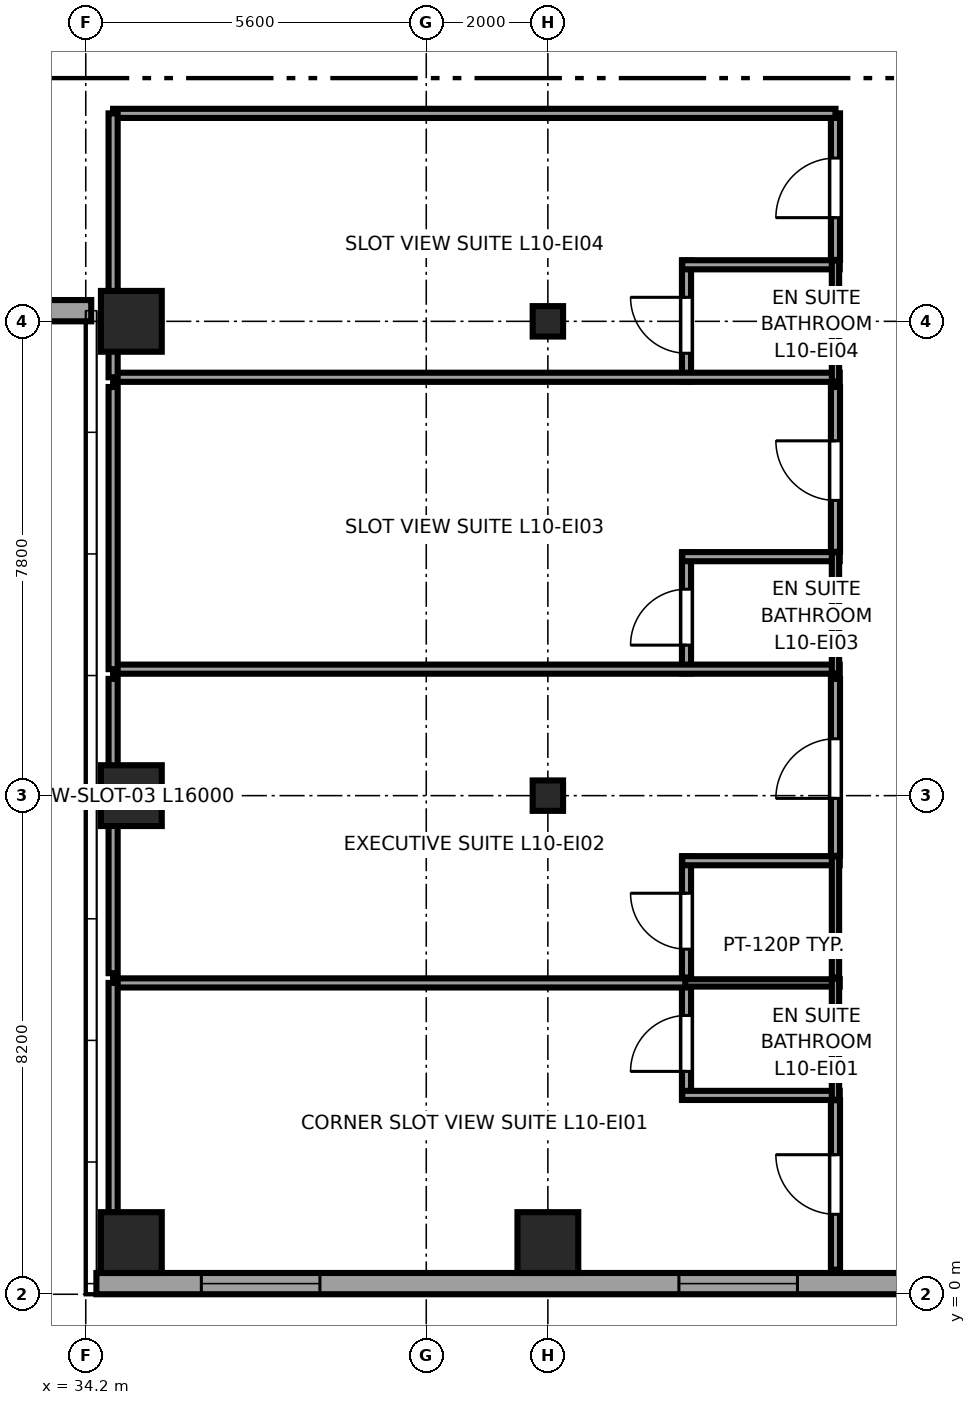
"""IFC4 building model, lengths in metres.
Left out: names, types, materials, properties, quantities, classifications, styles, units other than length and angle.
Written with IfcOpenShell. Run it as: python <this file> out.ifc"""

import sys

from ifc_helpers import new_model, si_unit, direction, frame, frame_2d, origin, origin_2d, place, context, subcontext, project, spatial, rectangle, i_section, extrude, source, transform, mapped, element, fill, save


model = new_model("IFC4")
c1 = context("Model", 3, precision=1e-05, world=origin(), true_north=direction((0.0, 1.0)))
c2 = subcontext(c1, "Body", "Model", "MODEL_VIEW")
j1 = project(units=[si_unit("LENGTHUNIT", "METRE"), si_unit("PLANEANGLEUNIT", "RADIAN")], contexts=[c1])
p1 = place(None, origin())
s1 = spatial("IfcSite", under=j1, at=p1, CompositionType="ELEMENT")
p2 = place(p1, origin())
s2 = spatial("IfcBuilding", under=s1, at=p2, CompositionType="ELEMENT")
p3 = place(p2, frame((0.0, 0.0, 46.2)))
s3 = spatial("IfcBuildingStorey", under=s2, at=p3, CompositionType="ELEMENT", Elevation=46.2)
m1 = source(origin(), c2, "Body", "SweptSolid", [
    extrude(rectangle(XDim=1.0, YDim=1.0, at=origin_2d()), origin(), (0.0, 0.0, 1.0), 3.55),
])
for number, where, z_axis, x_axis in (
    (1, (34.95, 0.85, 0.0), (0.0, 0.0, 1.0), (1.0, 0.0, 0.0)),
    (2, (34.95, 8.2, 0.0), (0.0, 0.0, 1.0), (1.0, 0.0, 0.0)),
    (3, (34.95, 16.0, 0.0), (0.0, 0.0, 1.0), (1.0, 0.0, 0.0)),
    (4, (41.8, 0.85, 0.0), (0.0, 0.0, 1.0), (1.0, 0.0, 0.0)),
):
    element("IfcColumn", number, at=place(p3, frame(where, z_axis=z_axis, x_axis=x_axis)), inside=s3, PredefinedType="COLUMN", context=c2, shape_type="MappedRepresentation", body=[
        mapped(m1, transform((0.0, 0.0, 0.0), x_axis=(1.0, 0.0, 0.0), y_axis=(0.0, 1.0, 0.0), z_axis=(0.0, 0.0, 1.0), scale=1.0)),
    ])
m2 = source(origin(), c2, "Body", "SweptSolid", [
    extrude(i_section(OverallWidth=0.5, OverallDepth=0.5, WebThickness=0.028, FlangeThickness=0.045, at=origin_2d()), origin(), (0.0, 0.0, 1.0), 3.55),
])
for number, where, z_axis, x_axis in (
    (5, (41.8, 8.2, 0.0), (0.0, 0.0, 1.0), (1.0, 0.0, 0.0)),
    (6, (41.8, 16.0, 0.0), (0.0, 0.0, 1.0), (1.0, 0.0, 0.0)),
):
    element("IfcColumn", number, at=place(p3, frame(where, z_axis=z_axis, x_axis=x_axis)), inside=s3, PredefinedType="COLUMN", context=c2, shape_type="MappedRepresentation", body=[
        mapped(m2, transform((0.0, 0.0, 0.0), x_axis=(1.0, 0.0, 0.0), y_axis=(0.0, 1.0, 0.0), z_axis=(0.0, 0.0, 1.0), scale=1.0)),
    ])
p4 = place(p3, frame((22.71, 16.175, 0.0), z_axis=(0.0, 0.0, 1.0), x_axis=(1.0, 0.0, 0.0)))
e7 = element("IfcWall", 7, at=p4, inside=s3, PredefinedType="SOLIDWALL", context=c2, shape_type="SweptSolid", body=[
    extrude(rectangle(XDim=11.58, YDim=0.35, at=frame_2d((5.79, 0.0))), origin(), (0.0, 0.0, 1.0), 2.748),
])
p5 = place(p4, frame((2.22, 0.0, 0.68)))
e8 = element("IfcOpeningElement", 8, at=p5, cuts=e7, PredefinedType="OPENING", context=c2, shape_type="SweptSolid", body=[
    extrude(rectangle(XDim=1.95, YDim=1.82, at=frame_2d((0.975, 0.91))), frame((0.0, 0.185, 0.0), z_axis=(0.0, -1.0, 0.0), x_axis=(1.0, 0.0, 0.0)), (0.0, 0.0, 1.0), 0.37),
])
p6 = place(p4, frame((7.41, 0.0, 0.68)))
e9 = element("IfcOpeningElement", 9, at=p6, cuts=e7, PredefinedType="OPENING", context=c2, shape_type="SweptSolid", body=[
    extrude(rectangle(XDim=1.95, YDim=1.82, at=frame_2d((0.975, 0.91))), frame((0.0, 0.185, 0.0), z_axis=(0.0, -1.0, 0.0), x_axis=(1.0, 0.0, 0.0)), (0.0, 0.0, 1.0), 0.37),
])
p7 = place(p3, frame((34.375, 0.175, 0.0), z_axis=(0.0, 0.0, 1.0), x_axis=(1.0, 0.0, 0.0)))
e10 = element("IfcWall", 10, at=p7, inside=s3, PredefinedType="SOLIDWALL", context=c2, shape_type="SweptSolid", body=[
    extrude(rectangle(XDim=18.008, YDim=0.35, at=frame_2d((9.004, 0.0))), origin(), (0.0, 0.0, 1.0), 3.37),
])
p8 = place(p7, frame((1.726, 0.0, 0.68)))
e11 = element("IfcOpeningElement", 11, at=p8, cuts=e10, PredefinedType="OPENING", context=c2, shape_type="SweptSolid", body=[
    extrude(rectangle(XDim=1.95, YDim=1.82, at=frame_2d((0.975, 0.91))), frame((0.0, 0.185, 0.0), z_axis=(0.0, -1.0, 0.0), x_axis=(1.0, 0.0, 0.0)), (0.0, 0.0, 1.0), 0.37),
])
p9 = place(p7, frame((9.58, 0.0, 0.68)))
e12 = element("IfcOpeningElement", 12, at=p9, cuts=e10, PredefinedType="OPENING", context=c2, shape_type="SweptSolid", body=[
    extrude(rectangle(XDim=1.95, YDim=1.82, at=frame_2d((0.975, 0.91))), frame((0.0, 0.185, 0.0), z_axis=(0.0, -1.0, 0.0), x_axis=(1.0, 0.0, 0.0)), (0.0, 0.0, 1.0), 0.37),
])
p10 = place(p7, frame((15.725, 0.0, 0.62)))
e13 = element("IfcOpeningElement", 13, at=p10, cuts=e10, PredefinedType="OPENING", context=c2, shape_type="SweptSolid", body=[
    extrude(rectangle(XDim=1.5, YDim=1.55, at=frame_2d((0.75, 0.775))), frame((0.0, 0.185, 0.0), z_axis=(0.0, -1.0, 0.0), x_axis=(1.0, 0.0, 0.0)), (0.0, 0.0, 1.0), 0.37),
])
p11 = place(p3, frame((44.08, 3.2, 0.0), z_axis=(0.0, 0.0, 1.0), x_axis=(0.0, 1.0, 0.0)))
e14 = element("IfcWall", 14, at=p11, inside=s3, PredefinedType="PARTITIONING", context=c2, shape_type="SweptSolid", body=[
    extrude(rectangle(XDim=1.99, YDim=0.15, at=frame_2d((0.995, 0.0))), origin(), (0.0, 0.0, 1.0), 3.37),
])
p12 = place(p11, frame((0.465, 0.0, 0.0)))
e15 = element("IfcOpeningElement", 15, at=p12, cuts=e14, PredefinedType="OPENING", context=c2, shape_type="SweptSolid", body=[
    extrude(rectangle(XDim=0.92, YDim=2.01, at=frame_2d((0.46, 1.005))), frame((0.0, 0.085, 0.0), z_axis=(0.0, -1.0, 0.0), x_axis=(1.0, 0.0, 0.0)), (0.0, 0.0, 1.0), 0.17),
])
p13 = place(p3, frame((44.01, 3.27, 0.0), z_axis=(0.0, 0.0, 1.0), x_axis=(1.0, 0.0, 0.0)))
e16 = element("IfcWall", 16, at=p13, inside=s3, PredefinedType="PARTITIONING", context=c2, shape_type="SweptSolid", body=[
    extrude(rectangle(XDim=2.59, YDim=0.15, at=frame_2d((1.295, 0.0))), origin(), (0.0, 0.0, 1.0), 3.37),
])
p14 = place(p3, frame((44.01, 5.12, 0.0), z_axis=(0.0, 0.0, 1.0), x_axis=(1.0, 0.0, 0.0)))
e17 = element("IfcWall", 17, at=p14, inside=s3, PredefinedType="PLUMBINGWALL", context=c2, shape_type="SweptSolid", body=[
    extrude(rectangle(XDim=2.59, YDim=0.12, at=frame_2d((1.295, 0.0))), origin(), (0.0, 0.0, 1.0), 3.37),
])
p15 = place(p3, frame((46.53, 3.2, 0.0), z_axis=(0.0, 0.0, 1.0), x_axis=(0.0, 1.0, 0.0)))
e18 = element("IfcWall", 18, at=p15, inside=s3, PredefinedType="PLUMBINGWALL", context=c2, shape_type="SweptSolid", body=[
    extrude(rectangle(XDim=1.99, YDim=0.12, at=frame_2d((0.995, 0.0))), origin(), (0.0, 0.0, 1.0), 3.37),
])
p16 = place(p3, frame((44.08, 5.21, 0.0), z_axis=(0.0, 0.0, 1.0), x_axis=(0.0, 1.0, 0.0)))
e19 = element("IfcWall", 19, at=p16, inside=s3, PredefinedType="PARTITIONING", context=c2, shape_type="SweptSolid", body=[
    extrude(rectangle(XDim=1.99, YDim=0.15, at=frame_2d((0.995, 0.0))), origin(), (0.0, 0.0, 1.0), 3.37),
])
p17 = place(p16, frame((0.465, 0.0, 0.0)))
e20 = element("IfcOpeningElement", 20, at=p17, cuts=e19, PredefinedType="OPENING", context=c2, shape_type="SweptSolid", body=[
    extrude(rectangle(XDim=0.92, YDim=2.01, at=frame_2d((0.46, 1.005))), frame((0.0, 0.085, 0.0), z_axis=(0.0, -1.0, 0.0), x_axis=(1.0, 0.0, 0.0)), (0.0, 0.0, 1.0), 0.17),
])
p18 = place(p3, frame((44.01, 7.13, 0.0), z_axis=(0.0, 0.0, 1.0), x_axis=(1.0, 0.0, 0.0)))
e21 = element("IfcWall", 21, at=p18, inside=s3, PredefinedType="PARTITIONING", context=c2, shape_type="SweptSolid", body=[
    extrude(rectangle(XDim=2.59, YDim=0.15, at=frame_2d((1.295, 0.0))), origin(), (0.0, 0.0, 1.0), 3.37),
])
p19 = place(p3, frame((46.53, 5.21, 0.0), z_axis=(0.0, 0.0, 1.0), x_axis=(0.0, 1.0, 0.0)))
e22 = element("IfcWall", 22, at=p19, inside=s3, PredefinedType="PLUMBINGWALL", context=c2, shape_type="SweptSolid", body=[
    extrude(rectangle(XDim=1.99, YDim=0.12, at=frame_2d((0.995, 0.0))), origin(), (0.0, 0.0, 1.0), 3.37),
])
p20 = place(p3, frame((44.08, 10.21, 0.0), z_axis=(0.0, 0.0, 1.0), x_axis=(0.0, 1.0, 0.0)))
e23 = element("IfcWall", 23, at=p20, inside=s3, PredefinedType="PARTITIONING", context=c2, shape_type="SweptSolid", body=[
    extrude(rectangle(XDim=1.99, YDim=0.15, at=frame_2d((0.995, 0.0))), origin(), (0.0, 0.0, 1.0), 3.37),
])
p21 = place(p20, frame((0.465, 0.0, 0.0)))
e24 = element("IfcOpeningElement", 24, at=p21, cuts=e23, PredefinedType="OPENING", context=c2, shape_type="SweptSolid", body=[
    extrude(rectangle(XDim=0.92, YDim=2.01, at=frame_2d((0.46, 1.005))), frame((0.0, 0.085, 0.0), z_axis=(0.0, -1.0, 0.0), x_axis=(1.0, 0.0, 0.0)), (0.0, 0.0, 1.0), 0.17),
])
p22 = place(p3, frame((34.65, 10.28, 0.0), z_axis=(0.0, 0.0, 1.0), x_axis=(1.0, 0.0, 0.0)))
e25 = element("IfcWall", 25, at=p22, inside=s3, PredefinedType="PARTITIONING", context=c2, shape_type="SweptSolid", body=[
    extrude(rectangle(XDim=11.95, YDim=0.15, at=frame_2d((5.975, 0.0))), origin(), (0.0, 0.0, 1.0), 3.37),
])
p23 = place(p3, frame((44.01, 12.13, 0.0), z_axis=(0.0, 0.0, 1.0), x_axis=(1.0, 0.0, 0.0)))
e26 = element("IfcWall", 26, at=p23, inside=s3, PredefinedType="PARTITIONING", context=c2, shape_type="SweptSolid", body=[
    extrude(rectangle(XDim=2.59, YDim=0.15, at=frame_2d((1.295, 0.0))), origin(), (0.0, 0.0, 1.0), 3.37),
])
p24 = place(p3, frame((46.53, 10.21, 0.0), z_axis=(0.0, 0.0, 1.0), x_axis=(0.0, 1.0, 0.0)))
e27 = element("IfcWall", 27, at=p24, inside=s3, PredefinedType="PLUMBINGWALL", context=c2, shape_type="SweptSolid", body=[
    extrude(rectangle(XDim=1.99, YDim=0.12, at=frame_2d((0.995, 0.0))), origin(), (0.0, 0.0, 1.0), 3.37),
])
p25 = place(p3, frame((44.08, 15.01, 0.0), z_axis=(0.0, 0.0, 1.0), x_axis=(0.0, 1.0, 0.0)))
e28 = element("IfcWall", 28, at=p25, inside=s3, PredefinedType="PARTITIONING", context=c2, shape_type="SweptSolid", body=[
    extrude(rectangle(XDim=1.99, YDim=0.15, at=frame_2d((0.995, 0.0))), origin(), (0.0, 0.0, 1.0), 3.37),
])
p26 = place(p25, frame((0.465, 0.0, 0.0)))
e29 = element("IfcOpeningElement", 29, at=p26, cuts=e28, PredefinedType="OPENING", context=c2, shape_type="SweptSolid", body=[
    extrude(rectangle(XDim=0.92, YDim=2.01, at=frame_2d((0.46, 1.005))), frame((0.0, 0.085, 0.0), z_axis=(0.0, -1.0, 0.0), x_axis=(1.0, 0.0, 0.0)), (0.0, 0.0, 1.0), 0.17),
])
p27 = place(p3, frame((34.65, 15.08, 0.0), z_axis=(0.0, 0.0, 1.0), x_axis=(1.0, 0.0, 0.0)))
e30 = element("IfcWall", 30, at=p27, inside=s3, PredefinedType="PARTITIONING", context=c2, shape_type="SweptSolid", body=[
    extrude(rectangle(XDim=11.95, YDim=0.15, at=frame_2d((5.975, 0.0))), origin(), (0.0, 0.0, 1.0), 3.37),
])
p28 = place(p3, frame((44.01, 16.93, 0.0), z_axis=(0.0, 0.0, 1.0), x_axis=(1.0, 0.0, 0.0)))
e31 = element("IfcWall", 31, at=p28, inside=s3, PredefinedType="PARTITIONING", context=c2, shape_type="SweptSolid", body=[
    extrude(rectangle(XDim=2.59, YDim=0.15, at=frame_2d((1.295, 0.0))), origin(), (0.0, 0.0, 1.0), 3.37),
])
p29 = place(p3, frame((46.53, 15.01, 0.0), z_axis=(0.0, 0.0, 1.0), x_axis=(0.0, 1.0, 0.0)))
e32 = element("IfcWall", 32, at=p29, inside=s3, PredefinedType="PLUMBINGWALL", context=c2, shape_type="SweptSolid", body=[
    extrude(rectangle(XDim=1.99, YDim=0.12, at=frame_2d((0.995, 0.0))), origin(), (0.0, 0.0, 1.0), 3.37),
])
p30 = place(p3, frame((46.53, 0.405, 0.0), z_axis=(0.0, 0.0, 1.0), x_axis=(0.0, 1.0, 0.0)))
e33 = element("IfcWall", 33, at=p30, inside=s3, PredefinedType="PARTITIONING", context=c2, shape_type="SweptSolid", body=[
    extrude(rectangle(XDim=2.785, YDim=0.15, at=frame_2d((1.393, 0.0))), origin(), (0.0, 0.0, 1.0), 3.37),
])
p31 = place(p30, frame((0.91, 0.0, 0.0)))
e34 = element("IfcOpeningElement", 34, at=p31, cuts=e33, PredefinedType="OPENING", context=c2, shape_type="SweptSolid", body=[
    extrude(rectangle(XDim=0.98, YDim=2.12, at=frame_2d((0.49, 1.06))), frame((0.0, 0.085, 0.0), z_axis=(0.0, -1.0, 0.0), x_axis=(1.0, 0.0, 0.0)), (0.0, 0.0, 1.0), 0.17),
])
p32 = place(p3, frame((34.65, 5.12, 0.0), z_axis=(0.0, 0.0, 1.0), x_axis=(1.0, 0.0, 0.0)))
e35 = element("IfcWall", 35, at=p32, inside=s3, PredefinedType="PARTITIONING", context=c2, shape_type="SweptSolid", body=[
    extrude(rectangle(XDim=9.41, YDim=0.15, at=frame_2d((4.705, 0.0))), origin(), (0.0, 0.0, 1.0), 3.37),
])
p33 = place(p3, frame((34.65, 0.405, 0.0), z_axis=(0.0, 0.0, 1.0), x_axis=(0.0, 1.0, 0.0)))
e36 = element("IfcWall", 36, at=p33, inside=s3, PredefinedType="PARTITIONING", context=c2, shape_type="SweptSolid", body=[
    extrude(rectangle(XDim=4.715, YDim=0.15, at=frame_2d((2.357, 0.0))), origin(), (0.0, 0.0, 1.0), 3.37),
])
p34 = place(p3, frame((46.53, 7.21, 0.0), z_axis=(0.0, 0.0, 1.0), x_axis=(0.0, 1.0, 0.0)))
e37 = element("IfcWall", 37, at=p34, inside=s3, PredefinedType="PARTITIONING", context=c2, shape_type="SweptSolid", body=[
    extrude(rectangle(XDim=2.91, YDim=0.15, at=frame_2d((1.455, 0.0))), origin(), (0.0, 0.0, 1.0), 3.37),
])
p35 = place(p34, frame((0.945, 0.0, 0.0)))
e38 = element("IfcOpeningElement", 38, at=p35, cuts=e37, PredefinedType="OPENING", context=c2, shape_type="SweptSolid", body=[
    extrude(rectangle(XDim=0.98, YDim=2.12, at=frame_2d((0.49, 1.06))), frame((0.0, 0.085, 0.0), z_axis=(0.0, -1.0, 0.0), x_axis=(1.0, 0.0, 0.0)), (0.0, 0.0, 1.0), 0.17),
])
p36 = place(p3, frame((34.65, 5.28, 0.0), z_axis=(0.0, 0.0, 1.0), x_axis=(0.0, 1.0, 0.0)))
e39 = element("IfcWall", 39, at=p36, inside=s3, PredefinedType="PARTITIONING", context=c2, shape_type="SweptSolid", body=[
    extrude(rectangle(XDim=4.84, YDim=0.15, at=frame_2d((2.42, 0.0))), origin(), (0.0, 0.0, 1.0), 3.37),
])
p37 = place(p3, frame((46.53, 12.21, 0.0), z_axis=(0.0, 0.0, 1.0), x_axis=(0.0, 1.0, 0.0)))
e40 = element("IfcWall", 40, at=p37, inside=s3, PredefinedType="PARTITIONING", context=c2, shape_type="SweptSolid", body=[
    extrude(rectangle(XDim=2.71, YDim=0.15, at=frame_2d((1.355, 0.0))), origin(), (0.0, 0.0, 1.0), 3.37),
])
p38 = place(p37, frame((0.845, 0.0, 0.0)))
e41 = element("IfcOpeningElement", 41, at=p38, cuts=e40, PredefinedType="OPENING", context=c2, shape_type="SweptSolid", body=[
    extrude(rectangle(XDim=0.98, YDim=2.12, at=frame_2d((0.49, 1.06))), frame((0.0, 0.085, 0.0), z_axis=(0.0, -1.0, 0.0), x_axis=(1.0, 0.0, 0.0)), (0.0, 0.0, 1.0), 0.17),
])
p39 = place(p3, frame((34.65, 10.28, 0.0), z_axis=(0.0, 0.0, 1.0), x_axis=(0.0, 1.0, 0.0)))
e42 = element("IfcWall", 42, at=p39, inside=s3, PredefinedType="PARTITIONING", context=c2, shape_type="SweptSolid", body=[
    extrude(rectangle(XDim=4.64, YDim=0.15, at=frame_2d((2.32, 0.0))), origin(), (0.0, 0.0, 1.0), 3.37),
])
p40 = place(p3, frame((46.53, 17.01, 0.0), z_axis=(0.0, 0.0, 1.0), x_axis=(0.0, 1.0, 0.0)))
e43 = element("IfcWall", 43, at=p40, inside=s3, PredefinedType="PARTITIONING", context=c2, shape_type="SweptSolid", body=[
    extrude(rectangle(XDim=2.41, YDim=0.15, at=frame_2d((1.205, 0.0))), origin(), (0.0, 0.0, 1.0), 3.37),
])
p41 = place(p40, frame((0.695, 0.0, 0.0)))
e44 = element("IfcOpeningElement", 44, at=p41, cuts=e43, PredefinedType="OPENING", context=c2, shape_type="SweptSolid", body=[
    extrude(rectangle(XDim=0.98, YDim=2.12, at=frame_2d((0.49, 1.06))), frame((0.0, 0.085, 0.0), z_axis=(0.0, -1.0, 0.0), x_axis=(1.0, 0.0, 0.0)), (0.0, 0.0, 1.0), 0.17),
])
p42 = place(p3, frame((34.65, 19.42, 0.0), z_axis=(0.0, 0.0, 1.0), x_axis=(1.0, 0.0, 0.0)))
e45 = element("IfcWall", 45, at=p42, inside=s3, PredefinedType="PARTITIONING", context=c2, shape_type="SweptSolid", body=[
    extrude(rectangle(XDim=11.88, YDim=0.15, at=frame_2d((5.94, 0.0))), origin(), (0.0, 0.0, 1.0), 3.37),
])
p43 = place(p3, frame((34.65, 15.08, 0.0), z_axis=(0.0, 0.0, 1.0), x_axis=(0.0, 1.0, 0.0)))
e46 = element("IfcWall", 46, at=p43, inside=s3, PredefinedType="PARTITIONING", context=c2, shape_type="SweptSolid", body=[
    extrude(rectangle(XDim=4.34, YDim=0.15, at=frame_2d((2.17, 0.0))), origin(), (0.0, 0.0, 1.0), 3.37),
])
m3 = source(origin(), c2, "Body", "SweptSolid", [
    extrude(rectangle(XDim=1.95, YDim=1.82, at=frame_2d((0.975, 0.91))), frame((0.0, 0.09, 0.0), z_axis=(0.0, -1.0, 0.0), x_axis=(1.0, 0.0, 0.0)), (0.0, 0.0, 1.0), 0.06),
])
p44 = place(p8, origin())
e47 = element("IfcWindow", 47, at=p44, inside=s3, PartitioningType="DOUBLE_PANEL_VERTICAL", PredefinedType="WINDOW", context=c2, shape_type="MappedRepresentation", body=[
    mapped(m3, transform((0.0, 0.0, 0.0), x_axis=(1.0, 0.0, 0.0), y_axis=(0.0, 1.0, 0.0), z_axis=(0.0, 0.0, 1.0), scale=1.0)),
])
fill(e11, e47)
p45 = place(p9, origin())
e48 = element("IfcWindow", 48, at=p45, inside=s3, PartitioningType="DOUBLE_PANEL_VERTICAL", PredefinedType="WINDOW", context=c2, shape_type="MappedRepresentation", body=[
    mapped(m3, transform((0.0, 0.0, 0.0), x_axis=(1.0, 0.0, 0.0), y_axis=(0.0, 1.0, 0.0), z_axis=(0.0, 0.0, 1.0), scale=1.0)),
])
fill(e12, e48)
m4 = source(origin(), c2, "Body", "SweptSolid", [
    extrude(rectangle(XDim=0.92, YDim=2.01, at=frame_2d((0.46, 1.005))), frame((0.0, 0.025, 0.0), z_axis=(0.0, -1.0, 0.0), x_axis=(1.0, 0.0, 0.0)), (0.0, 0.0, 1.0), 0.05),
])
p46 = place(p12, origin())
e49 = element("IfcDoor", 49, at=p46, inside=s3, OperationType="SINGLE_SWING_LEFT", PredefinedType="DOOR", context=c2, shape_type="MappedRepresentation", body=[
    mapped(m4, transform((0.0, 0.0, 0.0), x_axis=(1.0, 0.0, 0.0), y_axis=(0.0, 1.0, 0.0), z_axis=(0.0, 0.0, 1.0), scale=1.0)),
])
fill(e15, e49)
p47 = place(p17, origin())
e50 = element("IfcDoor", 50, at=p47, inside=s3, OperationType="SINGLE_SWING_RIGHT", PredefinedType="DOOR", context=c2, shape_type="MappedRepresentation", body=[
    mapped(m4, transform((0.0, 0.0, 0.0), x_axis=(1.0, 0.0, 0.0), y_axis=(0.0, 1.0, 0.0), z_axis=(0.0, 0.0, 1.0), scale=1.0)),
])
fill(e20, e50)
p48 = place(p21, origin())
e51 = element("IfcDoor", 51, at=p48, inside=s3, OperationType="SINGLE_SWING_LEFT", PredefinedType="DOOR", context=c2, shape_type="MappedRepresentation", body=[
    mapped(m4, transform((0.0, 0.0, 0.0), x_axis=(1.0, 0.0, 0.0), y_axis=(0.0, 1.0, 0.0), z_axis=(0.0, 0.0, 1.0), scale=1.0)),
])
fill(e24, e51)
p49 = place(p26, origin())
e52 = element("IfcDoor", 52, at=p49, inside=s3, OperationType="SINGLE_SWING_RIGHT", PredefinedType="DOOR", context=c2, shape_type="MappedRepresentation", body=[
    mapped(m4, transform((0.0, 0.0, 0.0), x_axis=(1.0, 0.0, 0.0), y_axis=(0.0, 1.0, 0.0), z_axis=(0.0, 0.0, 1.0), scale=1.0)),
])
fill(e29, e52)
m5 = source(origin(), c2, "Body", "SweptSolid", [
    extrude(rectangle(XDim=0.98, YDim=2.12, at=frame_2d((0.49, 1.06))), frame((0.0, 0.025, 0.0), z_axis=(0.0, -1.0, 0.0), x_axis=(1.0, 0.0, 0.0)), (0.0, 0.0, 1.0), 0.05),
])
p50 = place(p31, origin())
e53 = element("IfcDoor", 53, at=p50, inside=s3, OperationType="SINGLE_SWING_RIGHT", PredefinedType="DOOR", context=c2, shape_type="MappedRepresentation", body=[
    mapped(m5, transform((0.0, 0.0, 0.0), x_axis=(1.0, 0.0, 0.0), y_axis=(0.0, 1.0, 0.0), z_axis=(0.0, 0.0, 1.0), scale=1.0)),
])
fill(e34, e53)
p51 = place(p35, origin())
e54 = element("IfcDoor", 54, at=p51, inside=s3, OperationType="SINGLE_SWING_LEFT", PredefinedType="DOOR", context=c2, shape_type="MappedRepresentation", body=[
    mapped(m5, transform((0.0, 0.0, 0.0), x_axis=(1.0, 0.0, 0.0), y_axis=(0.0, 1.0, 0.0), z_axis=(0.0, 0.0, 1.0), scale=1.0)),
])
fill(e38, e54)
p52 = place(p38, origin())
e55 = element("IfcDoor", 55, at=p52, inside=s3, OperationType="SINGLE_SWING_RIGHT", PredefinedType="DOOR", context=c2, shape_type="MappedRepresentation", body=[
    mapped(m5, transform((0.0, 0.0, 0.0), x_axis=(1.0, 0.0, 0.0), y_axis=(0.0, 1.0, 0.0), z_axis=(0.0, 0.0, 1.0), scale=1.0)),
])
fill(e41, e55)
p53 = place(p41, origin())
e56 = element("IfcDoor", 56, at=p53, inside=s3, OperationType="SINGLE_SWING_LEFT", PredefinedType="DOOR", context=c2, shape_type="MappedRepresentation", body=[
    mapped(m5, transform((0.0, 0.0, 0.0), x_axis=(1.0, 0.0, 0.0), y_axis=(0.0, 1.0, 0.0), z_axis=(0.0, 0.0, 1.0), scale=1.0)),
])
fill(e44, e56)
save(model, sys.argv[1])
